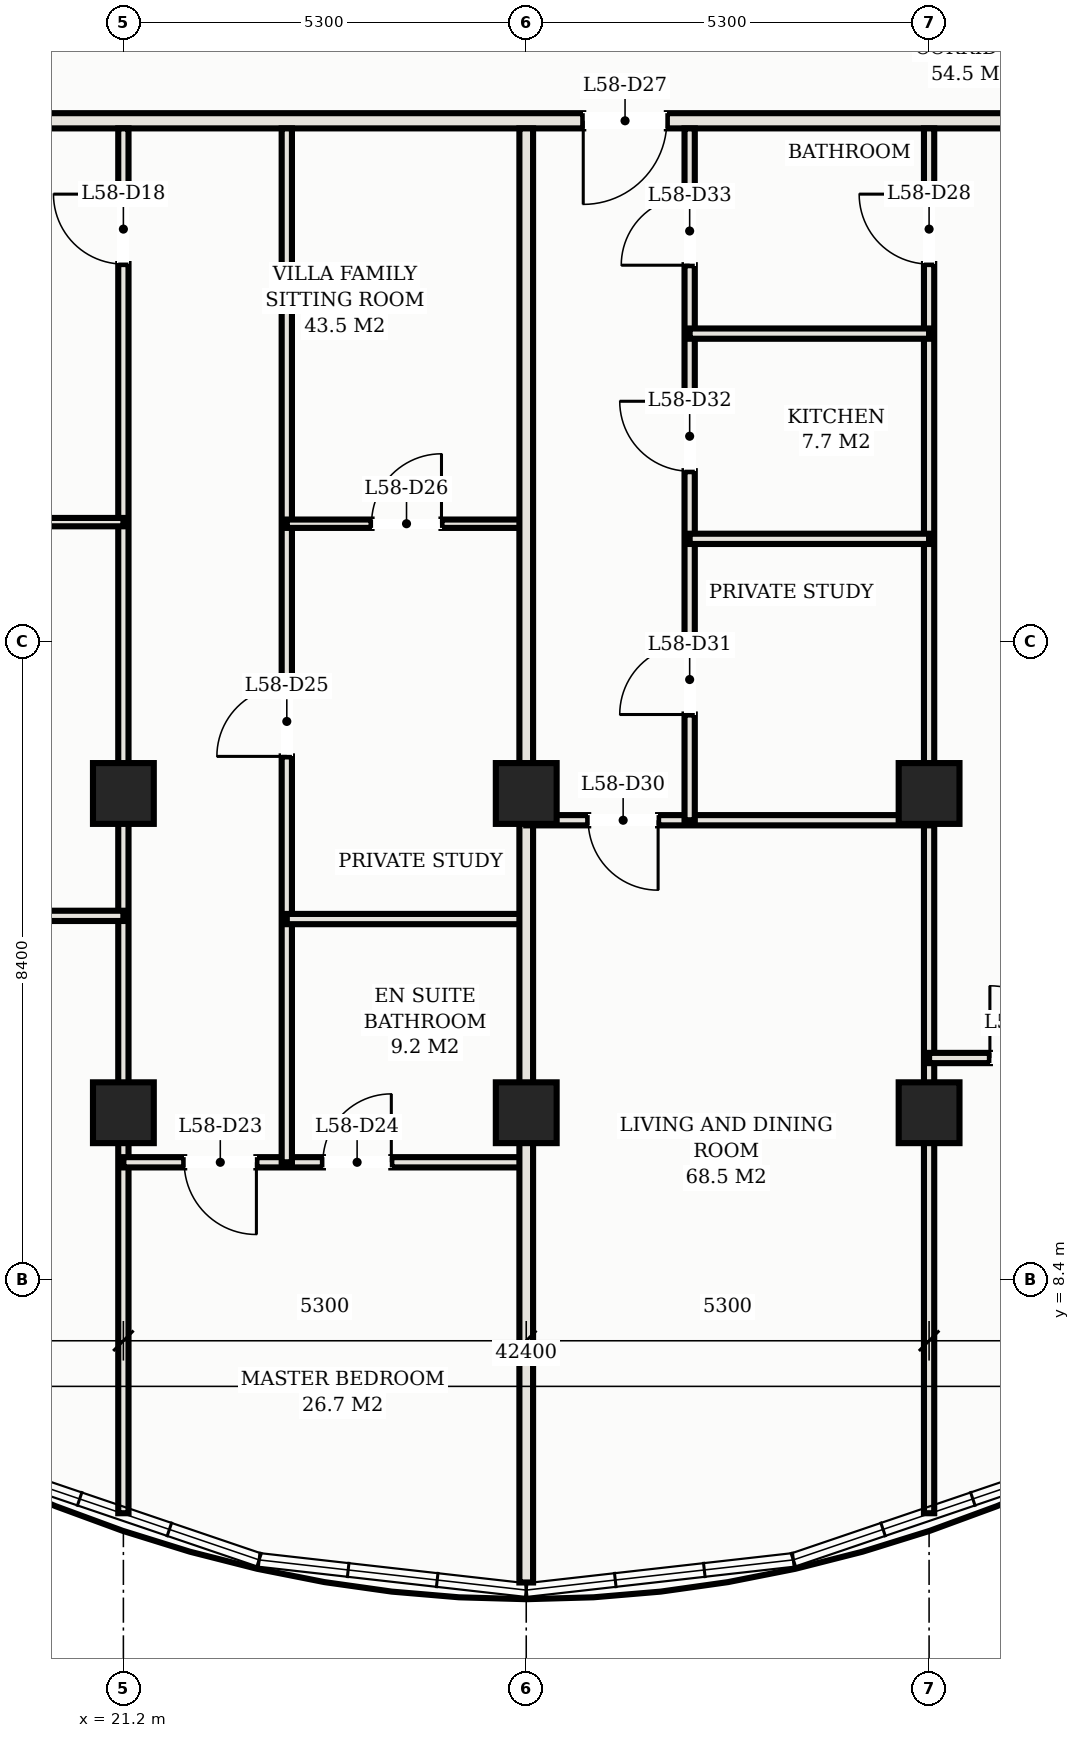
"""IFC4 building model, lengths in metres.
Left out: names, types, materials, properties, quantities, classifications, styles, units other than length and angle.
Written with IfcOpenShell. Run it as: python <this file> out.ifc"""

import sys

from ifc_helpers import new_model, si_unit, direction, frame, frame_2d, origin, origin_2d, place, context, subcontext, project, spatial, rectangle, hollow_rectangle, extrude, element, fill, save


model = new_model("IFC4")
c1 = context("Model", 3, precision=1e-05, world=origin(), true_north=direction((0.0, 1.0)))
c2 = subcontext(c1, "Body", "Model", "MODEL_VIEW")
j1 = project(units=[si_unit("LENGTHUNIT", "METRE"), si_unit("PLANEANGLEUNIT", "RADIAN")], contexts=[c1])
p1 = place(None, origin())
s1 = spatial("IfcSite", under=j1, at=p1, CompositionType="ELEMENT")
p2 = place(p1, origin())
s2 = spatial("IfcBuilding", under=s1, at=p2, CompositionType="ELEMENT")
p3 = place(p2, frame((0.0, 0.0, 213.2)))
s3 = spatial("IfcBuildingStorey", under=s2, at=p3, CompositionType="ELEMENT", Elevation=213.2)
for number, where, z_axis, x_axis in (
    (1, (21.2, 14.8, 0.0), (0.0, 0.0, 1.0), (1.0, 0.0, 0.0)),
    (2, (21.2, 10.6, 0.0), (0.0, 0.0, 1.0), (1.0, 0.0, 0.0)),
    (3, (26.5, 14.8, 0.0), (0.0, 0.0, 1.0), (1.0, 0.0, 0.0)),
    (4, (26.5, 10.6, 0.0), (0.0, 0.0, 1.0), (1.0, 0.0, 0.0)),
    (5, (31.8, 14.8, 0.0), (0.0, 0.0, 1.0), (1.0, 0.0, 0.0)),
    (6, (31.8, 10.6, 0.0), (0.0, 0.0, 1.0), (1.0, 0.0, 0.0)),
):
    element("IfcColumn", number, at=place(p3, frame(where, z_axis=z_axis, x_axis=x_axis)), inside=s3, PredefinedType="COLUMN", context=c2, shape_type="SweptSolid", body=[
        extrude(hollow_rectangle(XDim=0.8, YDim=0.8, WallThickness=0.028, at=origin_2d()), origin(), (0.0, 0.0, 1.0), 3.3),
    ])
p4 = place(p3, frame((6.72, 23.65, 0.0), z_axis=(0.0, 0.0, 1.0), x_axis=(1.0, 0.0, 0.0)))
e7 = element("IfcWall", 7, at=p4, inside=s3, PredefinedType="PARTITIONING", context=c2, shape_type="SweptSolid", body=[
    extrude(rectangle(XDim=39.56, YDim=0.2, at=frame_2d((19.78, 0.0))), origin(), (0.0, 0.0, 1.0), 2.43),
])
p5 = place(p4, frame((4.63, 0.0, 0.0)))
e8 = element("IfcOpeningElement", 8, at=p5, cuts=e7, PredefinedType="OPENING", context=c2, shape_type="SweptSolid", body=[
    extrude(rectangle(XDim=1.1, YDim=2.25, at=frame_2d((0.55, 1.125))), frame((0.0, 0.11, 0.0), z_axis=(0.0, -1.0, 0.0), x_axis=(1.0, 0.0, 0.0)), (0.0, 0.0, 1.0), 0.22),
])
p6 = place(p4, frame((20.53, 0.0, 0.0)))
e9 = element("IfcOpeningElement", 9, at=p6, cuts=e7, PredefinedType="OPENING", context=c2, shape_type="SweptSolid", body=[
    extrude(rectangle(XDim=1.1, YDim=2.25, at=frame_2d((0.55, 1.125))), frame((0.0, 0.11, 0.0), z_axis=(0.0, -1.0, 0.0), x_axis=(1.0, 0.0, 0.0)), (0.0, 0.0, 1.0), 0.22),
])
p7 = place(p4, frame((2.085, 0.0, 0.0)))
e10 = element("IfcOpeningElement", 10, at=p7, cuts=e7, PredefinedType="OPENING", context=c2, shape_type="SweptSolid", body=[
    extrude(rectangle(XDim=0.92, YDim=2.15, at=frame_2d((0.46, 1.075))), frame((0.0, 0.11, 0.0), z_axis=(0.0, -1.0, 0.0), x_axis=(1.0, 0.0, 0.0)), (0.0, 0.0, 1.0), 0.22),
])
p8 = place(p4, frame((36.555, 0.0, 0.0)))
e11 = element("IfcOpeningElement", 11, at=p8, cuts=e7, PredefinedType="OPENING", context=c2, shape_type="SweptSolid", body=[
    extrude(rectangle(XDim=0.92, YDim=2.15, at=frame_2d((0.46, 1.075))), frame((0.0, 0.11, 0.0), z_axis=(0.0, -1.0, 0.0), x_axis=(1.0, 0.0, 0.0)), (0.0, 0.0, 1.0), 0.22),
])
p9 = place(p3, frame((21.2, 5.331, 0.0), z_axis=(0.0, 0.0, 1.0), x_axis=(0.0, 1.0, 0.0)))
e12 = element("IfcWall", 12, at=p9, inside=s3, PredefinedType="PARTITIONING", context=c2, shape_type="SweptSolid", body=[
    extrude(rectangle(XDim=18.219, YDim=0.135, at=frame_2d((9.109, 0.0))), origin(), (0.0, 0.0, 1.0), 2.43),
])
p10 = place(p9, frame((16.434, 0.0, 0.0)))
e13 = element("IfcOpeningElement", 13, at=p10, cuts=e12, PredefinedType="OPENING", context=c2, shape_type="SweptSolid", body=[
    extrude(rectangle(XDim=0.92, YDim=2.15, at=frame_2d((0.46, 1.075))), frame((0.0, 0.078, 0.0), z_axis=(0.0, -1.0, 0.0), x_axis=(1.0, 0.0, 0.0)), (0.0, 0.0, 1.0), 0.155),
])
p11 = place(p3, frame((10.6, 13.19, 0.0), z_axis=(0.0, 0.0, 1.0), x_axis=(1.0, 0.0, 0.0)))
e14 = element("IfcWall", 14, at=p11, inside=s3, PredefinedType="PARTITIONING", context=c2, shape_type="SweptSolid", body=[
    extrude(rectangle(XDim=10.6, YDim=0.135, at=frame_2d((5.3, 0.0))), origin(), (0.0, 0.0, 1.0), 2.43),
])
p12 = place(p11, frame((0.425, 0.0, 0.0)))
e15 = element("IfcOpeningElement", 15, at=p12, cuts=e14, PredefinedType="OPENING", context=c2, shape_type="SweptSolid", body=[
    extrude(rectangle(XDim=1.5, YDim=2.25, at=frame_2d((0.75, 1.125))), frame((0.0, 0.078, 0.0), z_axis=(0.0, -1.0, 0.0), x_axis=(1.0, 0.0, 0.0)), (0.0, 0.0, 1.0), 0.155),
])
p13 = place(p3, frame((15.9, 18.37, 0.0), z_axis=(0.0, 0.0, 1.0), x_axis=(1.0, 0.0, 0.0)))
e16 = element("IfcWall", 16, at=p13, inside=s3, PredefinedType="MOVABLE", context=c2, shape_type="SweptSolid", body=[
    extrude(rectangle(XDim=5.3, YDim=0.11, at=frame_2d((2.65, 0.0))), origin(), (0.0, 0.0, 1.0), 2.43),
])
p14 = place(p13, frame((1.84, 0.0, 0.0)))
e17 = element("IfcOpeningElement", 17, at=p14, cuts=e16, PredefinedType="OPENING", context=c2, shape_type="SweptSolid", body=[
    extrude(rectangle(XDim=0.92, YDim=2.15, at=frame_2d((0.46, 1.075))), frame((0.0, 0.065, 0.0), z_axis=(0.0, -1.0, 0.0), x_axis=(1.0, 0.0, 0.0)), (0.0, 0.0, 1.0), 0.13),
])
p15 = place(p3, frame((21.2, 9.948, 0.0), z_axis=(0.0, 0.0, 1.0), x_axis=(1.0, 0.0, 0.0)))
e18 = element("IfcWall", 18, at=p15, inside=s3, PredefinedType="PARTITIONING", context=c2, shape_type="SweptSolid", body=[
    extrude(rectangle(XDim=5.3, YDim=0.135, at=frame_2d((2.65, 0.0))), origin(), (0.0, 0.0, 1.0), 2.43),
])
p16 = place(p15, frame((0.8, 0.0, 0.0)))
e19 = element("IfcOpeningElement", 19, at=p16, cuts=e18, PredefinedType="OPENING", context=c2, shape_type="SweptSolid", body=[
    extrude(rectangle(XDim=0.95, YDim=2.15, at=frame_2d((0.475, 1.075))), frame((0.0, 0.078, 0.0), z_axis=(0.0, -1.0, 0.0), x_axis=(1.0, 0.0, 0.0)), (0.0, 0.0, 1.0), 0.155),
])
p17 = place(p15, frame((2.625, 0.0, 0.0)))
e20 = element("IfcOpeningElement", 20, at=p17, cuts=e18, PredefinedType="OPENING", context=c2, shape_type="SweptSolid", body=[
    extrude(rectangle(XDim=0.9, YDim=2.15, at=frame_2d((0.45, 1.075))), frame((0.0, 0.078, 0.0), z_axis=(0.0, -1.0, 0.0), x_axis=(1.0, 0.0, 0.0)), (0.0, 0.0, 1.0), 0.155),
])
p18 = place(p3, frame((23.35, 9.948, 0.0), z_axis=(0.0, 0.0, 1.0), x_axis=(0.0, 1.0, 0.0)))
e21 = element("IfcWall", 21, at=p18, inside=s3, PredefinedType="PARTITIONING", context=c2, shape_type="SweptSolid", body=[
    extrude(rectangle(XDim=13.602, YDim=0.135, at=frame_2d((6.801, 0.0))), origin(), (0.0, 0.0, 1.0), 2.43),
])
p19 = place(p18, frame((5.34, 0.0, 0.0)))
e22 = element("IfcOpeningElement", 22, at=p19, cuts=e21, PredefinedType="OPENING", context=c2, shape_type="SweptSolid", body=[
    extrude(rectangle(XDim=0.92, YDim=2.15, at=frame_2d((0.46, 1.075))), frame((0.0, 0.078, 0.0), z_axis=(0.0, -1.0, 0.0), x_axis=(1.0, 0.0, 0.0)), (0.0, 0.0, 1.0), 0.155),
])
p20 = place(p3, frame((23.35, 13.148, 0.0), z_axis=(0.0, 0.0, 1.0), x_axis=(1.0, 0.0, 0.0)))
e23 = element("IfcWall", 23, at=p20, inside=s3, PredefinedType="PARTITIONING", context=c2, shape_type="SweptSolid", body=[
    extrude(rectangle(XDim=3.15, YDim=0.135, at=frame_2d((1.575, 0.0))), origin(), (0.0, 0.0, 1.0), 2.43),
])
p21 = place(p3, frame((23.35, 18.349, 0.0), z_axis=(0.0, 0.0, 1.0), x_axis=(1.0, 0.0, 0.0)))
e24 = element("IfcWall", 24, at=p21, inside=s3, PredefinedType="MOVABLE", context=c2, shape_type="SweptSolid", body=[
    extrude(rectangle(XDim=3.15, YDim=0.11, at=frame_2d((1.575, 0.0))), origin(), (0.0, 0.0, 1.0), 2.43),
])
p22 = place(p21, frame((1.115, 0.0, 0.0)))
e25 = element("IfcOpeningElement", 25, at=p22, cuts=e24, PredefinedType="OPENING", context=c2, shape_type="SweptSolid", body=[
    extrude(rectangle(XDim=0.92, YDim=2.15, at=frame_2d((0.46, 1.075))), frame((0.0, 0.065, 0.0), z_axis=(0.0, -1.0, 0.0), x_axis=(1.0, 0.0, 0.0)), (0.0, 0.0, 1.0), 0.13),
])
p23 = place(p3, frame((26.5, 4.42, 0.0), z_axis=(0.0, 0.0, 1.0), x_axis=(0.0, 1.0, 0.0)))
e26 = element("IfcWall", 26, at=p23, inside=s3, PredefinedType="PARTITIONING", context=c2, shape_type="SweptSolid", body=[
    extrude(rectangle(XDim=19.13, YDim=0.18, at=frame_2d((9.565, 0.0))), origin(), (0.0, 0.0, 1.0), 2.43),
])
p24 = place(p3, frame((31.8, 5.331, 0.0), z_axis=(0.0, 0.0, 1.0), x_axis=(0.0, 1.0, 0.0)))
e27 = element("IfcWall", 27, at=p24, inside=s3, PredefinedType="PARTITIONING", context=c2, shape_type="SweptSolid", body=[
    extrude(rectangle(XDim=18.219, YDim=0.135, at=frame_2d((9.109, 0.0))), origin(), (0.0, 0.0, 1.0), 2.43),
])
p25 = place(p24, frame((16.434, 0.0, 0.0)))
e28 = element("IfcOpeningElement", 28, at=p25, cuts=e27, PredefinedType="OPENING", context=c2, shape_type="SweptSolid", body=[
    extrude(rectangle(XDim=0.92, YDim=2.15, at=frame_2d((0.46, 1.075))), frame((0.0, 0.078, 0.0), z_axis=(0.0, -1.0, 0.0), x_axis=(1.0, 0.0, 0.0)), (0.0, 0.0, 1.0), 0.155),
])
p26 = place(p3, frame((26.5, 14.448, 0.0), z_axis=(0.0, 0.0, 1.0), x_axis=(1.0, 0.0, 0.0)))
e29 = element("IfcWall", 29, at=p26, inside=s3, PredefinedType="PARTITIONING", context=c2, shape_type="SweptSolid", body=[
    extrude(rectangle(XDim=5.3, YDim=0.135, at=frame_2d((2.65, 0.0))), origin(), (0.0, 0.0, 1.0), 2.43),
])
p27 = place(p26, frame((0.815, 0.0, 0.0)))
e30 = element("IfcOpeningElement", 30, at=p27, cuts=e29, PredefinedType="OPENING", context=c2, shape_type="SweptSolid", body=[
    extrude(rectangle(XDim=0.92, YDim=2.15, at=frame_2d((0.46, 1.075))), frame((0.0, 0.078, 0.0), z_axis=(0.0, -1.0, 0.0), x_axis=(1.0, 0.0, 0.0)), (0.0, 0.0, 1.0), 0.155),
])
p28 = place(p3, frame((28.65, 14.448, 0.0), z_axis=(0.0, 0.0, 1.0), x_axis=(0.0, 1.0, 0.0)))
e31 = element("IfcWall", 31, at=p28, inside=s3, PredefinedType="PARTITIONING", context=c2, shape_type="SweptSolid", body=[
    extrude(rectangle(XDim=9.102, YDim=0.135, at=frame_2d((4.551, 0.0))), origin(), (0.0, 0.0, 1.0), 2.43),
])
p29 = place(p28, frame((1.391, 0.0, 0.0)))
e32 = element("IfcOpeningElement", 32, at=p29, cuts=e31, PredefinedType="OPENING", context=c2, shape_type="SweptSolid", body=[
    extrude(rectangle(XDim=0.92, YDim=2.15, at=frame_2d((0.46, 1.075))), frame((0.0, 0.078, 0.0), z_axis=(0.0, -1.0, 0.0), x_axis=(1.0, 0.0, 0.0)), (0.0, 0.0, 1.0), 0.155),
])
p30 = place(p28, frame((4.592, 0.0, 0.0)))
e33 = element("IfcOpeningElement", 33, at=p30, cuts=e31, PredefinedType="OPENING", context=c2, shape_type="SweptSolid", body=[
    extrude(rectangle(XDim=0.92, YDim=2.15, at=frame_2d((0.46, 1.075))), frame((0.0, 0.078, 0.0), z_axis=(0.0, -1.0, 0.0), x_axis=(1.0, 0.0, 0.0)), (0.0, 0.0, 1.0), 0.155),
])
p31 = place(p28, frame((7.302, 0.0, 0.0)))
e34 = element("IfcOpeningElement", 34, at=p31, cuts=e31, PredefinedType="OPENING", context=c2, shape_type="SweptSolid", body=[
    extrude(rectangle(XDim=0.9, YDim=2.15, at=frame_2d((0.45, 1.075))), frame((0.0, 0.078, 0.0), z_axis=(0.0, -1.0, 0.0), x_axis=(1.0, 0.0, 0.0)), (0.0, 0.0, 1.0), 0.155),
])
for number, where, z_axis, x_axis in (
    (35, (28.65, 18.15, 0.0), (0.0, 0.0, 1.0), (1.0, 0.0, 0.0)),
    (36, (28.65, 20.85, 0.0), (0.0, 0.0, 1.0), (1.0, 0.0, 0.0)),
):
    element("IfcWall", number, at=place(p3, frame(where, z_axis=z_axis, x_axis=x_axis)), inside=s3, PredefinedType="PARTITIONING", context=c2, shape_type="SweptSolid", body=[
        extrude(rectangle(XDim=3.15, YDim=0.135, at=frame_2d((1.575, 0.0))), origin(), (0.0, 0.0, 1.0), 2.43),
    ])
p32 = place(p3, frame((31.8, 11.32, 0.0), z_axis=(0.0, 0.0, 1.0), x_axis=(1.0, 0.0, 0.0)))
e37 = element("IfcWall", 37, at=p32, inside=s3, PredefinedType="PARTITIONING", context=c2, shape_type="SweptSolid", body=[
    extrude(rectangle(XDim=5.3, YDim=0.135, at=frame_2d((2.65, 0.0))), origin(), (0.0, 0.0, 1.0), 2.43),
])
p33 = place(p32, frame((0.8, 0.0, 0.0)))
e38 = element("IfcOpeningElement", 38, at=p33, cuts=e37, PredefinedType="OPENING", context=c2, shape_type="SweptSolid", body=[
    extrude(rectangle(XDim=0.95, YDim=2.15, at=frame_2d((0.475, 1.075))), frame((0.0, 0.078, 0.0), z_axis=(0.0, -1.0, 0.0), x_axis=(1.0, 0.0, 0.0)), (0.0, 0.0, 1.0), 0.155),
])
p34 = place(p32, frame((2.875, 0.0, 0.0)))
e39 = element("IfcOpeningElement", 39, at=p34, cuts=e37, PredefinedType="OPENING", context=c2, shape_type="SweptSolid", body=[
    extrude(rectangle(XDim=0.9, YDim=2.15, at=frame_2d((0.45, 1.075))), frame((0.0, 0.078, 0.0), z_axis=(0.0, -1.0, 0.0), x_axis=(1.0, 0.0, 0.0)), (0.0, 0.0, 1.0), 0.155),
])
p35 = place(p10, origin())
e40 = element("IfcDoor", 40, at=p35, inside=s3, OperationType="SINGLE_SWING_RIGHT", PredefinedType="DOOR", context=c2, shape_type="SweptSolid", body=[
    extrude(rectangle(XDim=0.92, YDim=2.15, at=frame_2d((0.46, 1.075))), frame((0.0, 0.025, 0.0), z_axis=(0.0, -1.0, 0.0), x_axis=(1.0, 0.0, 0.0)), (0.0, 0.0, 1.0), 0.05),
])
fill(e13, e40)
p36 = place(p16, frame((0.95, 0.0, 0.0), z_axis=(0.0, 0.0, 1.0), x_axis=(-1.0, 0.0, 0.0)))
e41 = element("IfcDoor", 41, at=p36, inside=s3, OperationType="SINGLE_SWING_LEFT", PredefinedType="DOOR", context=c2, shape_type="SweptSolid", body=[
    extrude(rectangle(XDim=0.95, YDim=2.15, at=frame_2d((0.475, 1.075))), frame((0.0, 0.025, 0.0), z_axis=(0.0, -1.0, 0.0), x_axis=(1.0, 0.0, 0.0)), (0.0, 0.0, 1.0), 0.05),
])
fill(e19, e41)
p37 = place(p17, origin())
e42 = element("IfcDoor", 42, at=p37, inside=s3, OperationType="SINGLE_SWING_RIGHT", PredefinedType="DOOR", context=c2, shape_type="SweptSolid", body=[
    extrude(rectangle(XDim=0.9, YDim=2.15, at=frame_2d((0.45, 1.075))), frame((0.0, 0.025, 0.0), z_axis=(0.0, -1.0, 0.0), x_axis=(1.0, 0.0, 0.0)), (0.0, 0.0, 1.0), 0.05),
])
fill(e20, e42)
p38 = place(p19, origin())
e43 = element("IfcDoor", 43, at=p38, inside=s3, OperationType="SINGLE_SWING_LEFT", PredefinedType="DOOR", context=c2, shape_type="SweptSolid", body=[
    extrude(rectangle(XDim=0.92, YDim=2.15, at=frame_2d((0.46, 1.075))), frame((0.0, 0.025, 0.0), z_axis=(0.0, -1.0, 0.0), x_axis=(1.0, 0.0, 0.0)), (0.0, 0.0, 1.0), 0.05),
])
fill(e22, e43)
p39 = place(p22, origin())
e44 = element("IfcDoor", 44, at=p39, inside=s3, OperationType="SINGLE_SWING_RIGHT", PredefinedType="DOOR", context=c2, shape_type="SweptSolid", body=[
    extrude(rectangle(XDim=0.92, YDim=2.15, at=frame_2d((0.46, 1.075))), frame((0.0, 0.025, 0.0), z_axis=(0.0, -1.0, 0.0), x_axis=(1.0, 0.0, 0.0)), (0.0, 0.0, 1.0), 0.05),
])
fill(e25, e44)
p40 = place(p6, frame((1.1, 0.0, 0.0), z_axis=(0.0, 0.0, 1.0), x_axis=(-1.0, 0.0, 0.0)))
e45 = element("IfcDoor", 45, at=p40, inside=s3, OperationType="SINGLE_SWING_RIGHT", PredefinedType="DOOR", context=c2, shape_type="SweptSolid", body=[
    extrude(rectangle(XDim=1.1, YDim=2.25, at=frame_2d((0.55, 1.125))), frame((0.0, 0.025, 0.0), z_axis=(0.0, -1.0, 0.0), x_axis=(1.0, 0.0, 0.0)), (0.0, 0.0, 1.0), 0.05),
])
fill(e9, e45)
p41 = place(p25, origin())
e46 = element("IfcDoor", 46, at=p41, inside=s3, OperationType="SINGLE_SWING_RIGHT", PredefinedType="DOOR", context=c2, shape_type="SweptSolid", body=[
    extrude(rectangle(XDim=0.92, YDim=2.15, at=frame_2d((0.46, 1.075))), frame((0.0, 0.025, 0.0), z_axis=(0.0, -1.0, 0.0), x_axis=(1.0, 0.0, 0.0)), (0.0, 0.0, 1.0), 0.05),
])
fill(e28, e46)
p42 = place(p27, frame((0.92, 0.0, 0.0), z_axis=(0.0, 0.0, 1.0), x_axis=(-1.0, 0.0, 0.0)))
e47 = element("IfcDoor", 47, at=p42, inside=s3, OperationType="SINGLE_SWING_LEFT", PredefinedType="DOOR", context=c2, shape_type="SweptSolid", body=[
    extrude(rectangle(XDim=0.92, YDim=2.15, at=frame_2d((0.46, 1.075))), frame((0.0, 0.025, 0.0), z_axis=(0.0, -1.0, 0.0), x_axis=(1.0, 0.0, 0.0)), (0.0, 0.0, 1.0), 0.05),
])
fill(e30, e47)
p43 = place(p29, origin())
e48 = element("IfcDoor", 48, at=p43, inside=s3, OperationType="SINGLE_SWING_LEFT", PredefinedType="DOOR", context=c2, shape_type="SweptSolid", body=[
    extrude(rectangle(XDim=0.92, YDim=2.15, at=frame_2d((0.46, 1.075))), frame((0.0, 0.025, 0.0), z_axis=(0.0, -1.0, 0.0), x_axis=(1.0, 0.0, 0.0)), (0.0, 0.0, 1.0), 0.05),
])
fill(e32, e48)
p44 = place(p30, origin())
e49 = element("IfcDoor", 49, at=p44, inside=s3, OperationType="SINGLE_SWING_RIGHT", PredefinedType="DOOR", context=c2, shape_type="SweptSolid", body=[
    extrude(rectangle(XDim=0.92, YDim=2.15, at=frame_2d((0.46, 1.075))), frame((0.0, 0.025, 0.0), z_axis=(0.0, -1.0, 0.0), x_axis=(1.0, 0.0, 0.0)), (0.0, 0.0, 1.0), 0.05),
])
fill(e33, e49)
p45 = place(p31, origin())
e50 = element("IfcDoor", 50, at=p45, inside=s3, OperationType="SINGLE_SWING_LEFT", PredefinedType="DOOR", context=c2, shape_type="SweptSolid", body=[
    extrude(rectangle(XDim=0.9, YDim=2.15, at=frame_2d((0.45, 1.075))), frame((0.0, 0.025, 0.0), z_axis=(0.0, -1.0, 0.0), x_axis=(1.0, 0.0, 0.0)), (0.0, 0.0, 1.0), 0.05),
])
fill(e34, e50)
p46 = place(p33, origin())
e51 = element("IfcDoor", 51, at=p46, inside=s3, OperationType="SINGLE_SWING_LEFT", PredefinedType="DOOR", context=c2, shape_type="SweptSolid", body=[
    extrude(rectangle(XDim=0.95, YDim=2.15, at=frame_2d((0.475, 1.075))), frame((0.0, 0.025, 0.0), z_axis=(0.0, -1.0, 0.0), x_axis=(1.0, 0.0, 0.0)), (0.0, 0.0, 1.0), 0.05),
])
fill(e38, e51)
save(model, sys.argv[1])
